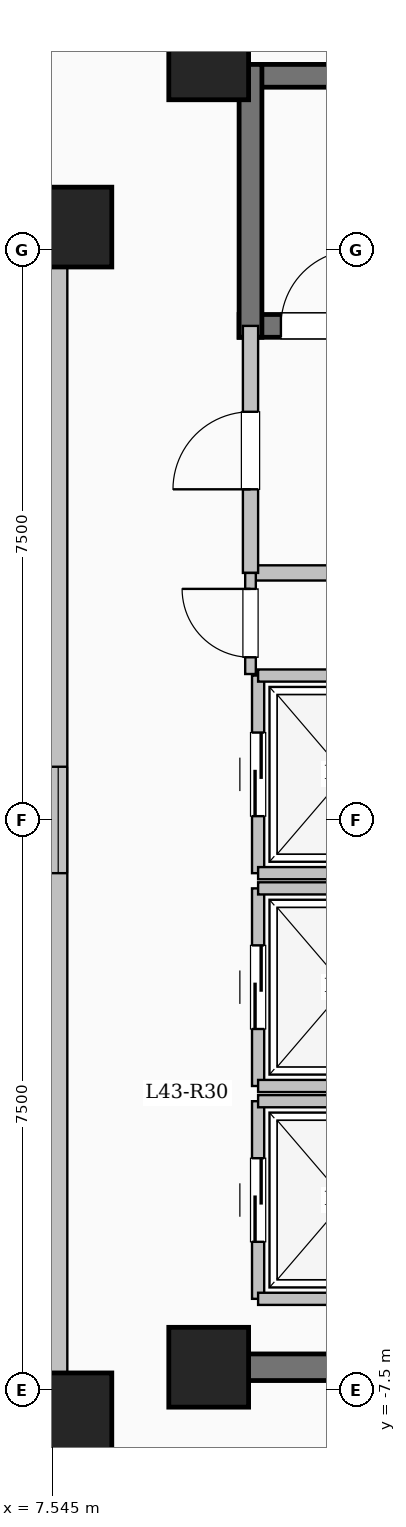
"""IFC4 building model, lengths in metres.
Left out: names, types, materials, properties, quantities, classifications, styles, units other than length and angle.
Written with IfcOpenShell. Run it as: python <this file> out.ifc"""

import sys

from ifc_helpers import new_model, si_unit, direction, frame, frame_2d, origin, origin_2d, place, context, subcontext, project, spatial, rectangle, extrude, element, fill, save


model = new_model("IFC4")
c1 = context("Model", 3, precision=1e-05, world=origin(), true_north=direction((0.0, 1.0)))
c2 = subcontext(c1, "Body", "Model", "MODEL_VIEW")
j1 = project(units=[si_unit("LENGTHUNIT", "METRE"), si_unit("PLANEANGLEUNIT", "RADIAN")], contexts=[c1])
p1 = place(None, origin())
s1 = spatial("IfcSite", under=j1, at=p1, CompositionType="ELEMENT")
p2 = place(p1, origin())
s2 = spatial("IfcBuilding", under=s1, at=p2, CompositionType="ELEMENT")
p3 = place(p2, frame((0.0, 0.0, 159.4)))
s3 = spatial("IfcBuildingStorey", under=s2, at=p3, CompositionType="ELEMENT", Elevation=159.4)
for number, where, z_axis, x_axis in (
    (1, (7.8, -7.8, 0.0), (0.0, 0.0, 1.0), (1.0, 0.0, 0.0)),
    (2, (7.8, 7.8, 0.0), (0.0, 0.0, 1.0), (1.0, 0.0, 0.0)),
    (3, (9.6, -7.2, 0.0), (0.0, 0.0, 1.0), (1.0, 0.0, 0.0)),
    (4, (9.6, 10.0, 0.0), (0.0, 0.0, 1.0), (1.0, 0.0, 0.0)),
):
    element("IfcColumn", number, at=place(p3, frame(where, z_axis=z_axis, x_axis=x_axis)), inside=s3, PredefinedType="COLUMN", context=c2, shape_type="SweptSolid", body=[
        extrude(rectangle(XDim=1.05, YDim=1.05, at=origin_2d()), origin(), (0.0, 0.0, 1.0), 3.35),
    ])
p4 = place(p3, frame((-7.62, -7.62, 0.0), z_axis=(0.0, 0.0, 1.0), x_axis=(1.0, 0.0, 0.0)))
e5 = element("IfcWall", 5, at=p4, inside=s3, PredefinedType="SOLIDWALL", context=c2, shape_type="SweptSolid", body=[
    extrude(rectangle(XDim=15.24, YDim=0.24, at=frame_2d((7.62, 0.0))), origin(), (0.0, 0.0, 1.0), 3.1),
])
p5 = place(p4, frame((6.92, 0.0, 0.95)))
e6 = element("IfcOpeningElement", 6, at=p5, cuts=e5, PredefinedType="OPENING", context=c2, shape_type="SweptSolid", body=[
    extrude(rectangle(XDim=1.4, YDim=1.5, at=frame_2d((0.7, 0.75))), frame((0.0, 0.13, 0.0), z_axis=(0.0, -1.0, 0.0), x_axis=(1.0, 0.0, 0.0)), (0.0, 0.0, 1.0), 0.26),
])
p6 = place(p3, frame((7.62, -7.62, 0.0), z_axis=(0.0, 0.0, 1.0), x_axis=(0.0, 1.0, 0.0)))
e7 = element("IfcWall", 7, at=p6, inside=s3, PredefinedType="SOLIDWALL", context=c2, shape_type="SweptSolid", body=[
    extrude(rectangle(XDim=15.24, YDim=0.24, at=frame_2d((7.62, 0.0))), origin(), (0.0, 0.0, 1.0), 3.1),
])
p7 = place(p6, frame((6.92, 0.0, 0.95)))
e8 = element("IfcOpeningElement", 8, at=p7, cuts=e7, PredefinedType="OPENING", context=c2, shape_type="SweptSolid", body=[
    extrude(rectangle(XDim=1.4, YDim=1.5, at=frame_2d((0.7, 0.75))), frame((0.0, 0.13, 0.0), z_axis=(0.0, -1.0, 0.0), x_axis=(1.0, 0.0, 0.0)), (0.0, 0.0, 1.0), 0.26),
])
p8 = place(p3, frame((7.62, 7.62, 0.0), z_axis=(0.0, 0.0, 1.0), x_axis=(-1.0, 0.0, 0.0)))
e9 = element("IfcWall", 9, at=p8, inside=s3, PredefinedType="SOLIDWALL", context=c2, shape_type="SweptSolid", body=[
    extrude(rectangle(XDim=15.24, YDim=0.24, at=frame_2d((7.62, 0.0))), origin(), (0.0, 0.0, 1.0), 3.1),
])
p9 = place(p8, frame((6.92, 0.0, 0.95)))
e10 = element("IfcOpeningElement", 10, at=p9, cuts=e9, PredefinedType="OPENING", context=c2, shape_type="SweptSolid", body=[
    extrude(rectangle(XDim=1.4, YDim=1.5, at=frame_2d((0.7, 0.75))), frame((0.0, 0.13, 0.0), z_axis=(0.0, -1.0, 0.0), x_axis=(1.0, 0.0, 0.0)), (0.0, 0.0, 1.0), 0.26),
])
p10 = place(p3, frame((10.0, 9.79, 0.0), z_axis=(0.0, 0.0, 1.0), x_axis=(1.0, 0.0, 0.0)))
e11 = element("IfcWall", 11, at=p10, inside=s3, PredefinedType="SHEAR", context=c2, shape_type="SweptSolid", body=[
    extrude(rectangle(XDim=8.0, YDim=0.3, at=frame_2d((4.0, 0.0))), origin(), (0.0, 0.0, 1.0), 3.35),
])
p11 = place(p3, frame((10.0, 6.5, 0.0), z_axis=(0.0, 0.0, 1.0), x_axis=(1.0, 0.0, 0.0)))
e12 = element("IfcWall", 12, at=p11, inside=s3, PredefinedType="SHEAR", context=c2, shape_type="SweptSolid", body=[
    extrude(rectangle(XDim=8.0, YDim=0.3, at=frame_2d((4.0, 0.0))), origin(), (0.0, 0.0, 1.0), 3.35),
])
p12 = place(p11, frame((0.55, 0.0, 0.0)))
e13 = element("IfcOpeningElement", 13, at=p12, cuts=e12, PredefinedType="OPENING", context=c2, shape_type="SweptSolid", body=[
    extrude(rectangle(XDim=1.0, YDim=2.15, at=frame_2d((0.5, 1.075))), frame((0.0, 0.16, 0.0), z_axis=(0.0, -1.0, 0.0), x_axis=(1.0, 0.0, 0.0)), (0.0, 0.0, 1.0), 0.32),
])
p13 = place(p3, frame((10.15, 6.35, 0.0), z_axis=(0.0, 0.0, 1.0), x_axis=(0.0, 1.0, 0.0)))
e14 = element("IfcWall", 14, at=p13, inside=s3, PredefinedType="SHEAR", context=c2, shape_type="SweptSolid", body=[
    extrude(rectangle(XDim=3.59, YDim=0.3, at=frame_2d((1.795, 0.0))), origin(), (0.0, 0.0, 1.0), 3.35),
])
p14 = place(p3, frame((10.15, 3.25, 0.0), z_axis=(0.0, 0.0, 1.0), x_axis=(1.0, 0.0, 0.0)))
e15 = element("IfcWall", 15, at=p14, inside=s3, PredefinedType="SOLIDWALL", context=c2, shape_type="SweptSolid", body=[
    extrude(rectangle(XDim=5.4, YDim=0.2, at=frame_2d((2.7, 0.0))), origin(), (0.0, 0.0, 1.0), 3.1),
])
p15 = place(p3, frame((10.15, 3.25, 0.0), z_axis=(0.0, 0.0, 1.0), x_axis=(0.0, 1.0, 0.0)))
e16 = element("IfcWall", 16, at=p15, inside=s3, PredefinedType="SOLIDWALL", context=c2, shape_type="SweptSolid", body=[
    extrude(rectangle(XDim=3.25, YDim=0.2, at=frame_2d((1.625, 0.0))), origin(), (0.0, 0.0, 1.0), 3.1),
])
p16 = place(p15, frame((1.1, 0.0, 0.0)))
e17 = element("IfcOpeningElement", 17, at=p16, cuts=e16, PredefinedType="OPENING", context=c2, shape_type="SweptSolid", body=[
    extrude(rectangle(XDim=1.02, YDim=2.15, at=frame_2d((0.51, 1.075))), frame((0.0, 0.11, 0.0), z_axis=(0.0, -1.0, 0.0), x_axis=(1.0, 0.0, 0.0)), (0.0, 0.0, 1.0), 0.22),
])
p17 = place(p3, frame((10.25, -6.3, 0.0), z_axis=(0.0, 0.0, 1.0), x_axis=(0.0, 1.0, 0.0)))
e18 = element("IfcWall", 18, at=p17, inside=s3, PredefinedType="SOLIDWALL", context=c2, shape_type="SweptSolid", body=[
    extrude(rectangle(XDim=2.6, YDim=0.16, at=frame_2d((1.3, 0.0))), origin(), (0.0, 0.0, 1.0), 3.1),
])
p18 = place(p17, frame((0.75, 0.0, 0.0)))
e19 = element("IfcOpeningElement", 19, at=p18, cuts=e18, PredefinedType="OPENING", context=c2, shape_type="SweptSolid", body=[
    extrude(rectangle(XDim=1.1, YDim=2.15, at=frame_2d((0.55, 1.075))), frame((0.0, 0.09, 0.0), z_axis=(0.0, -1.0, 0.0), x_axis=(1.0, 0.0, 0.0)), (0.0, 0.0, 1.0), 0.18),
])
for number, where, z_axis, x_axis in (
    (20, (10.25, -6.3, 0.0), (0.0, 0.0, 1.0), (1.0, 0.0, 0.0)),
    (21, (10.25, -3.7, 0.0), (0.0, 0.0, 1.0), (1.0, 0.0, 0.0)),
):
    element("IfcWall", number, at=place(p3, frame(where, z_axis=z_axis, x_axis=x_axis)), inside=s3, PredefinedType="SOLIDWALL", context=c2, shape_type="SweptSolid", body=[
        extrude(rectangle(XDim=2.3, YDim=0.16, at=frame_2d((1.15, 0.0))), origin(), (0.0, 0.0, 1.0), 3.1),
    ])
p19 = place(p3, frame((10.25, -3.5, 0.0), z_axis=(0.0, 0.0, 1.0), x_axis=(0.0, 1.0, 0.0)))
e22 = element("IfcWall", 22, at=p19, inside=s3, PredefinedType="SOLIDWALL", context=c2, shape_type="SweptSolid", body=[
    extrude(rectangle(XDim=2.6, YDim=0.16, at=frame_2d((1.3, 0.0))), origin(), (0.0, 0.0, 1.0), 3.1),
])
p20 = place(p19, frame((0.75, 0.0, 0.0)))
e23 = element("IfcOpeningElement", 23, at=p20, cuts=e22, PredefinedType="OPENING", context=c2, shape_type="SweptSolid", body=[
    extrude(rectangle(XDim=1.1, YDim=2.15, at=frame_2d((0.55, 1.075))), frame((0.0, 0.09, 0.0), z_axis=(0.0, -1.0, 0.0), x_axis=(1.0, 0.0, 0.0)), (0.0, 0.0, 1.0), 0.18),
])
for number, where, z_axis, x_axis in (
    (24, (10.25, -3.5, 0.0), (0.0, 0.0, 1.0), (1.0, 0.0, 0.0)),
    (25, (10.25, -0.9, 0.0), (0.0, 0.0, 1.0), (1.0, 0.0, 0.0)),
):
    element("IfcWall", number, at=place(p3, frame(where, z_axis=z_axis, x_axis=x_axis)), inside=s3, PredefinedType="SOLIDWALL", context=c2, shape_type="SweptSolid", body=[
        extrude(rectangle(XDim=2.3, YDim=0.16, at=frame_2d((1.15, 0.0))), origin(), (0.0, 0.0, 1.0), 3.1),
    ])
p21 = place(p3, frame((10.25, -0.7, 0.0), z_axis=(0.0, 0.0, 1.0), x_axis=(0.0, 1.0, 0.0)))
e26 = element("IfcWall", 26, at=p21, inside=s3, PredefinedType="SOLIDWALL", context=c2, shape_type="SweptSolid", body=[
    extrude(rectangle(XDim=2.6, YDim=0.16, at=frame_2d((1.3, 0.0))), origin(), (0.0, 0.0, 1.0), 3.1),
])
p22 = place(p21, frame((0.75, 0.0, 0.0)))
e27 = element("IfcOpeningElement", 27, at=p22, cuts=e26, PredefinedType="OPENING", context=c2, shape_type="SweptSolid", body=[
    extrude(rectangle(XDim=1.1, YDim=2.15, at=frame_2d((0.55, 1.075))), frame((0.0, 0.09, 0.0), z_axis=(0.0, -1.0, 0.0), x_axis=(1.0, 0.0, 0.0)), (0.0, 0.0, 1.0), 0.18),
])
for number, where, z_axis, x_axis in (
    (28, (10.25, -0.7, 0.0), (0.0, 0.0, 1.0), (1.0, 0.0, 0.0)),
    (29, (10.25, 1.9, 0.0), (0.0, 0.0, 1.0), (1.0, 0.0, 0.0)),
):
    element("IfcWall", number, at=place(p3, frame(where, z_axis=z_axis, x_axis=x_axis)), inside=s3, PredefinedType="SOLIDWALL", context=c2, shape_type="SweptSolid", body=[
        extrude(rectangle(XDim=2.3, YDim=0.16, at=frame_2d((1.15, 0.0))), origin(), (0.0, 0.0, 1.0), 3.1),
    ])
p23 = place(p3, frame((10.075, -7.2, 0.0), z_axis=(0.0, 0.0, 1.0), x_axis=(1.0, 0.0, 0.0)))
e30 = element("IfcWall", 30, at=p23, inside=s3, PredefinedType="SHEAR", context=c2, shape_type="SweptSolid", body=[
    extrude(rectangle(XDim=8.55, YDim=0.35, at=frame_2d((4.275, 0.0))), origin(), (0.0, 0.0, 1.0), 3.35),
])
p24 = place(p3, frame((10.15, 1.92, 0.0), z_axis=(0.0, 0.0, 1.0), x_axis=(0.0, 1.0, 0.0)))
e31 = element("IfcWall", 31, at=p24, inside=s3, PredefinedType="PARTITIONING", context=c2, shape_type="SweptSolid", body=[
    extrude(rectangle(XDim=1.33, YDim=0.14, at=frame_2d((0.665, 0.0))), origin(), (0.0, 0.0, 1.0), 3.1),
])
p25 = place(p24, frame((0.22, 0.0, 0.0)))
e32 = element("IfcOpeningElement", 32, at=p25, cuts=e31, PredefinedType="OPENING", context=c2, shape_type="SweptSolid", body=[
    extrude(rectangle(XDim=0.9, YDim=2.08, at=frame_2d((0.45, 1.04))), frame((0.0, 0.08, 0.0), z_axis=(0.0, -1.0, 0.0), x_axis=(1.0, 0.0, 0.0)), (0.0, 0.0, 1.0), 0.16),
])
p26 = place(p7, origin())
e33 = element("IfcWindow", 33, at=p26, inside=s3, PartitioningType="SINGLE_PANEL", PredefinedType="WINDOW", context=c2, shape_type="SweptSolid", body=[
    extrude(rectangle(XDim=1.4, YDim=1.5, at=frame_2d((0.7, 0.75))), frame((0.0, 0.03, 0.0), z_axis=(0.0, -1.0, 0.0), x_axis=(1.0, 0.0, 0.0)), (0.0, 0.0, 1.0), 0.06),
])
fill(e8, e33)
p27 = place(p12, origin())
e34 = element("IfcDoor", 34, at=p27, inside=s3, OperationType="SINGLE_SWING_RIGHT", PredefinedType="DOOR", context=c2, shape_type="SweptSolid", body=[
    extrude(rectangle(XDim=1.0, YDim=2.15, at=frame_2d((0.5, 1.075))), frame((0.0, 0.025, 0.0), z_axis=(0.0, -1.0, 0.0), x_axis=(1.0, 0.0, 0.0)), (0.0, 0.0, 1.0), 0.05),
])
fill(e13, e34)
p28 = place(p16, origin())
e35 = element("IfcDoor", 35, at=p28, inside=s3, OperationType="SINGLE_SWING_LEFT", PredefinedType="DOOR", context=c2, shape_type="SweptSolid", body=[
    extrude(rectangle(XDim=1.02, YDim=2.15, at=frame_2d((0.51, 1.075))), frame((0.0, 0.025, 0.0), z_axis=(0.0, -1.0, 0.0), x_axis=(1.0, 0.0, 0.0)), (0.0, 0.0, 1.0), 0.05),
])
fill(e17, e35)
p29 = place(p18, origin())
e36 = element("IfcDoor", 36, at=p29, inside=s3, OperationType="SLIDING_TO_LEFT", PredefinedType="DOOR", context=c2, shape_type="SweptSolid", body=[
    extrude(rectangle(XDim=1.1, YDim=2.15, at=frame_2d((0.55, 1.075))), frame((0.0, 0.025, 0.0), z_axis=(0.0, -1.0, 0.0), x_axis=(1.0, 0.0, 0.0)), (0.0, 0.0, 1.0), 0.05),
])
fill(e19, e36)
p30 = place(p20, origin())
e37 = element("IfcDoor", 37, at=p30, inside=s3, OperationType="SLIDING_TO_LEFT", PredefinedType="DOOR", context=c2, shape_type="SweptSolid", body=[
    extrude(rectangle(XDim=1.1, YDim=2.15, at=frame_2d((0.55, 1.075))), frame((0.0, 0.025, 0.0), z_axis=(0.0, -1.0, 0.0), x_axis=(1.0, 0.0, 0.0)), (0.0, 0.0, 1.0), 0.05),
])
fill(e23, e37)
p31 = place(p22, origin())
e38 = element("IfcDoor", 38, at=p31, inside=s3, OperationType="SLIDING_TO_LEFT", PredefinedType="DOOR", context=c2, shape_type="SweptSolid", body=[
    extrude(rectangle(XDim=1.1, YDim=2.15, at=frame_2d((0.55, 1.075))), frame((0.0, 0.025, 0.0), z_axis=(0.0, -1.0, 0.0), x_axis=(1.0, 0.0, 0.0)), (0.0, 0.0, 1.0), 0.05),
])
fill(e27, e38)
p32 = place(p25, origin())
e39 = element("IfcDoor", 39, at=p32, inside=s3, OperationType="SINGLE_SWING_RIGHT", PredefinedType="DOOR", context=c2, shape_type="SweptSolid", body=[
    extrude(rectangle(XDim=0.9, YDim=2.08, at=frame_2d((0.45, 1.04))), frame((0.0, 0.025, 0.0), z_axis=(0.0, -1.0, 0.0), x_axis=(1.0, 0.0, 0.0)), (0.0, 0.0, 1.0), 0.05),
])
fill(e32, e39)
save(model, sys.argv[1])
